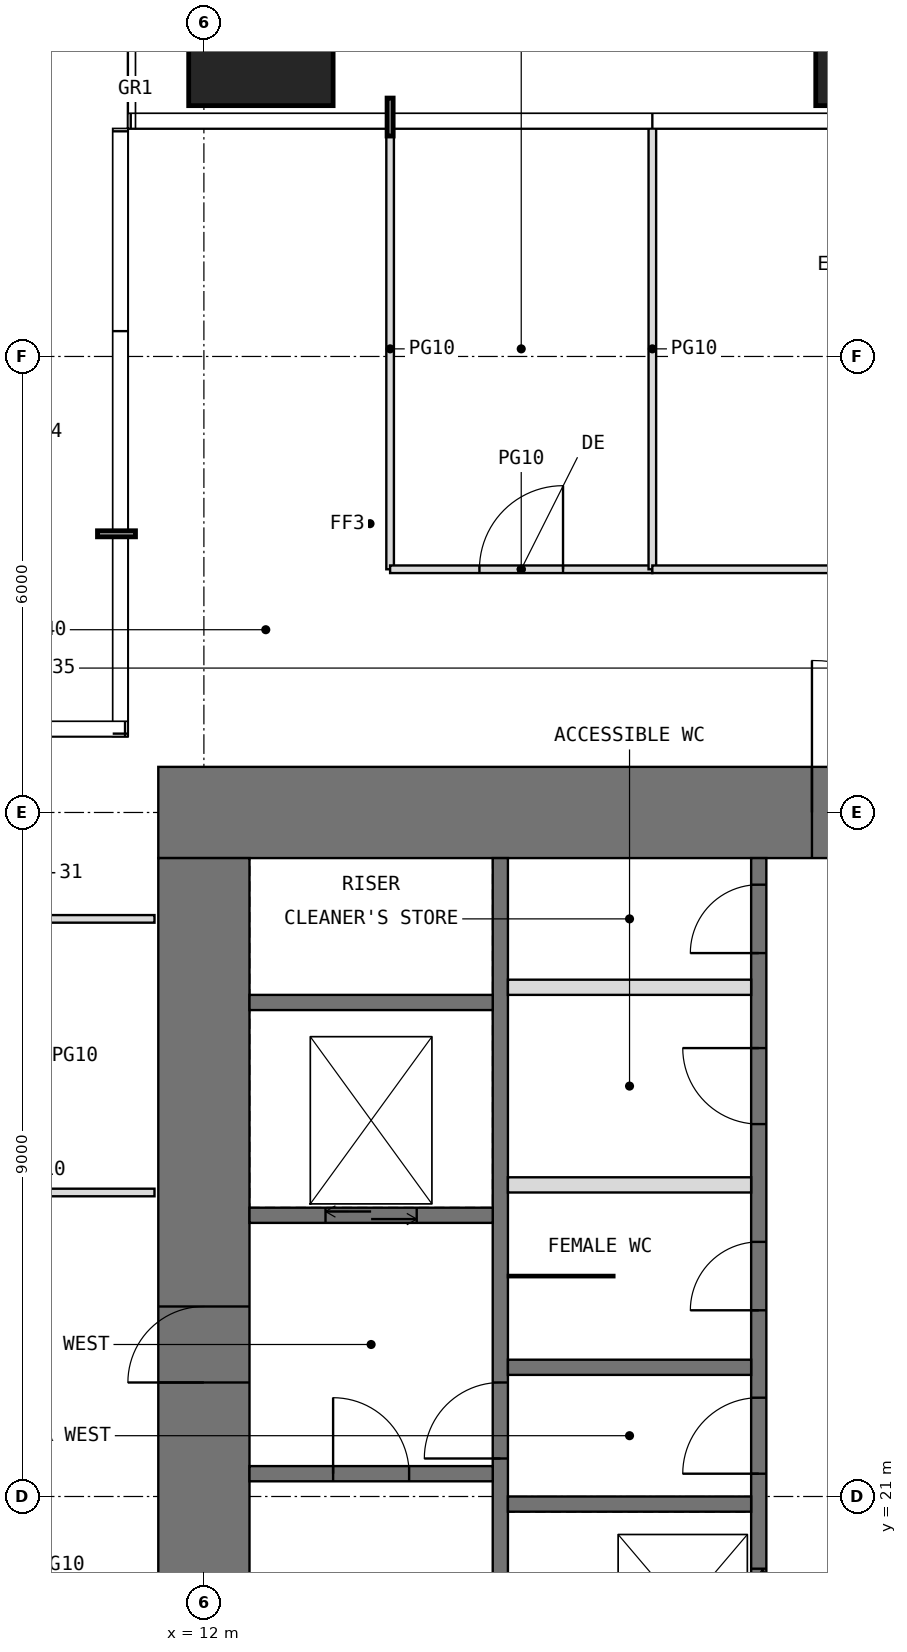
"""IFC4 building model, lengths in metres.
Left out: names, types, materials, properties, quantities, classifications, styles, units other than length and angle.
Written with IfcOpenShell. Run it as: python <this file> out.ifc"""

import sys

from ifc_helpers import new_model, si_unit, direction, frame, frame_2d, origin, origin_2d, place, context, subcontext, project, spatial, rectangle, extrude, element, fill, save


model = new_model("IFC4")
c1 = context("Model", 3, precision=1e-05, world=origin(), true_north=direction((0.0, 1.0)))
c2 = subcontext(c1, "Body", "Model", "MODEL_VIEW")
j1 = project(units=[si_unit("LENGTHUNIT", "METRE"), si_unit("PLANEANGLEUNIT", "RADIAN")], contexts=[c1])
p1 = place(None, origin())
s1 = spatial("IfcSite", under=j1, at=p1, CompositionType="ELEMENT")
p2 = place(p1, origin())
s2 = spatial("IfcBuilding", under=s1, at=p2, CompositionType="ELEMENT")
p3 = place(p2, frame((0.0, 0.0, 252.4)))
s3 = spatial("IfcBuildingStorey", under=s2, at=p3, CompositionType="ELEMENT", Elevation=252.4)
for number, where, z_axis, x_axis in (
    (1, (12.75, 40.25, 0.0), (0.0, 0.0, 1.0), (1.0, 0.0, 0.0)),
    (2, (21.0, 40.25, 0.0), (0.0, 0.0, 1.0), (1.0, 0.0, 0.0)),
):
    element("IfcColumn", number, at=place(p3, frame(where, z_axis=z_axis, x_axis=x_axis)), inside=s3, PredefinedType="COLUMN", context=c2, shape_type="SweptSolid", body=[
        extrude(rectangle(XDim=1.9, YDim=1.9, at=origin_2d()), origin(), (0.0, 0.0, 1.0), 4.2),
    ])
p4 = place(p3, frame((11.4, 30.0, -0.05), z_axis=(0.0, 0.0, 1.0), x_axis=(1.0, 0.0, 0.0)))
e3 = element("IfcWall", 3, at=p4, inside=s3, PredefinedType="SHEAR", context=c2, shape_type="SweptSolid", body=[
    extrude(rectangle(XDim=19.2, YDim=1.2, at=frame_2d((9.6, 0.0))), origin(), (0.0, 0.0, 1.0), 4.2),
])
p5 = place(p4, frame((8.6, 0.0, 0.05)))
e4 = element("IfcOpeningElement", 4, at=p5, cuts=e3, PredefinedType="OPENING", context=c2, shape_type="SweptSolid", body=[
    extrude(rectangle(XDim=2.0, YDim=2.2, at=frame_2d((1.0, 1.1))), frame((0.0, 0.61, 0.0), z_axis=(0.0, -1.0, 0.0), x_axis=(1.0, 0.0, 0.0)), (0.0, 0.0, 1.0), 1.22),
])
p6 = place(p3, frame((12.0, 12.6, -0.05), z_axis=(0.0, 0.0, 1.0), x_axis=(0.0, 1.0, 0.0)))
e5 = element("IfcWall", 5, at=p6, inside=s3, PredefinedType="SHEAR", context=c2, shape_type="SweptSolid", body=[
    extrude(rectangle(XDim=16.8, YDim=1.2, at=frame_2d((8.4, 0.0))), origin(), (0.0, 0.0, 1.0), 4.2),
])
p7 = place(p6, frame((9.9, 0.0, 0.05)))
e6 = element("IfcOpeningElement", 6, at=p7, cuts=e5, PredefinedType="OPENING", context=c2, shape_type="SweptSolid", body=[
    extrude(rectangle(XDim=1.0, YDim=2.2, at=frame_2d((0.5, 1.1))), frame((0.0, 0.61, 0.0), z_axis=(0.0, -1.0, 0.0), x_axis=(1.0, 0.0, 0.0)), (0.0, 0.0, 1.0), 1.22),
])
p8 = place(p3, frame((15.9, 12.6, -0.05), z_axis=(0.0, 0.0, 1.0), x_axis=(0.0, 1.0, 0.0)))
e7 = element("IfcWall", 7, at=p8, inside=s3, PredefinedType="SHEAR", context=c2, shape_type="SweptSolid", body=[
    extrude(rectangle(XDim=16.8, YDim=0.2, at=frame_2d((8.4, 0.0))), origin(), (0.0, 0.0, 1.0), 4.2),
])
p9 = place(p8, frame((8.9, 0.0, 0.05)))
e8 = element("IfcOpeningElement", 8, at=p9, cuts=e7, PredefinedType="OPENING", context=c2, shape_type="SweptSolid", body=[
    extrude(rectangle(XDim=1.0, YDim=2.2, at=frame_2d((0.5, 1.1))), frame((0.0, 0.11, 0.0), z_axis=(0.0, -1.0, 0.0), x_axis=(1.0, 0.0, 0.0)), (0.0, 0.0, 1.0), 0.22),
])
p10 = place(p3, frame((19.3, 12.6, -0.05), z_axis=(0.0, 0.0, 1.0), x_axis=(0.0, 1.0, 0.0)))
e9 = element("IfcWall", 9, at=p10, inside=s3, PredefinedType="SHEAR", context=c2, shape_type="SweptSolid", body=[
    extrude(rectangle(XDim=16.8, YDim=0.2, at=frame_2d((8.4, 0.0))), origin(), (0.0, 0.0, 1.0), 4.2),
])
p11 = place(p10, frame((8.7, 0.0, 0.05)))
e10 = element("IfcOpeningElement", 10, at=p11, cuts=e9, PredefinedType="OPENING", context=c2, shape_type="SweptSolid", body=[
    extrude(rectangle(XDim=1.0, YDim=2.2, at=frame_2d((0.5, 1.1))), frame((0.0, 0.11, 0.0), z_axis=(0.0, -1.0, 0.0), x_axis=(1.0, 0.0, 0.0)), (0.0, 0.0, 1.0), 0.22),
])
p12 = place(p10, frame((10.85, 0.0, 0.05)))
e11 = element("IfcOpeningElement", 11, at=p12, cuts=e9, PredefinedType="OPENING", context=c2, shape_type="SweptSolid", body=[
    extrude(rectangle(XDim=0.9, YDim=2.2, at=frame_2d((0.45, 1.1))), frame((0.0, 0.11, 0.0), z_axis=(0.0, -1.0, 0.0), x_axis=(1.0, 0.0, 0.0)), (0.0, 0.0, 1.0), 0.22),
])
p13 = place(p10, frame((13.3, 0.0, 0.05)))
e12 = element("IfcOpeningElement", 12, at=p13, cuts=e9, PredefinedType="OPENING", context=c2, shape_type="SweptSolid", body=[
    extrude(rectangle(XDim=1.0, YDim=2.2, at=frame_2d((0.5, 1.1))), frame((0.0, 0.11, 0.0), z_axis=(0.0, -1.0, 0.0), x_axis=(1.0, 0.0, 0.0)), (0.0, 0.0, 1.0), 0.22),
])
p14 = place(p10, frame((15.55, 0.0, 0.05)))
e13 = element("IfcOpeningElement", 13, at=p14, cuts=e9, PredefinedType="OPENING", context=c2, shape_type="SweptSolid", body=[
    extrude(rectangle(XDim=0.9, YDim=2.2, at=frame_2d((0.45, 1.1))), frame((0.0, 0.11, 0.0), z_axis=(0.0, -1.0, 0.0), x_axis=(1.0, 0.0, 0.0)), (0.0, 0.0, 1.0), 0.22),
])
p15 = place(p10, frame((0.75, 0.0, 0.05)))
e14 = element("IfcOpeningElement", 14, at=p15, cuts=e9, PredefinedType="OPENING", context=c2, shape_type="SweptSolid", body=[
    extrude(rectangle(XDim=1.1, YDim=2.2, at=frame_2d((0.55, 1.1))), frame((0.0, 0.11, 0.0), z_axis=(0.0, -1.0, 0.0), x_axis=(1.0, 0.0, 0.0)), (0.0, 0.0, 1.0), 0.22),
])
p16 = place(p10, frame((3.55, 0.0, 0.05)))
e15 = element("IfcOpeningElement", 15, at=p16, cuts=e9, PredefinedType="OPENING", context=c2, shape_type="SweptSolid", body=[
    extrude(rectangle(XDim=1.1, YDim=2.2, at=frame_2d((0.55, 1.1))), frame((0.0, 0.11, 0.0), z_axis=(0.0, -1.0, 0.0), x_axis=(1.0, 0.0, 0.0)), (0.0, 0.0, 1.0), 0.22),
])
p17 = place(p10, frame((6.35, 0.0, 0.05)))
e16 = element("IfcOpeningElement", 16, at=p17, cuts=e9, PredefinedType="OPENING", context=c2, shape_type="SweptSolid", body=[
    extrude(rectangle(XDim=1.1, YDim=2.2, at=frame_2d((0.55, 1.1))), frame((0.0, 0.11, 0.0), z_axis=(0.0, -1.0, 0.0), x_axis=(1.0, 0.0, 0.0)), (0.0, 0.0, 1.0), 0.22),
])
p18 = place(p3, frame((12.6, 21.3, -0.05), z_axis=(0.0, 0.0, 1.0), x_axis=(1.0, 0.0, 0.0)))
e17 = element("IfcWall", 17, at=p18, inside=s3, PredefinedType="SHEAR", context=c2, shape_type="SweptSolid", body=[
    extrude(rectangle(XDim=3.2, YDim=0.2, at=frame_2d((1.6, 0.0))), origin(), (0.0, 0.0, 1.0), 4.2),
])
p19 = place(p18, frame((1.1, 0.0, 0.05)))
e18 = element("IfcOpeningElement", 18, at=p19, cuts=e17, PredefinedType="OPENING", context=c2, shape_type="SweptSolid", body=[
    extrude(rectangle(XDim=1.0, YDim=2.2, at=frame_2d((0.5, 1.1))), frame((0.0, 0.11, 0.0), z_axis=(0.0, -1.0, 0.0), x_axis=(1.0, 0.0, 0.0)), (0.0, 0.0, 1.0), 0.22),
])
p20 = place(p3, frame((12.6, 24.7, -0.05), z_axis=(0.0, 0.0, 1.0), x_axis=(1.0, 0.0, 0.0)))
e19 = element("IfcWall", 19, at=p20, inside=s3, PredefinedType="SHEAR", context=c2, shape_type="SweptSolid", body=[
    extrude(rectangle(XDim=3.2, YDim=0.2, at=frame_2d((1.6, 0.0))), origin(), (0.0, 0.0, 1.0), 4.2),
])
p21 = place(p20, frame((1.0, 0.0, 0.05)))
e20 = element("IfcOpeningElement", 20, at=p21, cuts=e19, PredefinedType="OPENING", context=c2, shape_type="SweptSolid", body=[
    extrude(rectangle(XDim=1.2, YDim=2.2, at=frame_2d((0.6, 1.1))), frame((0.0, 0.11, 0.0), z_axis=(0.0, -1.0, 0.0), x_axis=(1.0, 0.0, 0.0)), (0.0, 0.0, 1.0), 0.22),
])
for number, where, z_axis, x_axis in (
    (21, (12.6, 27.5, -0.05), (0.0, 0.0, 1.0), (1.0, 0.0, 0.0)),
    (22, (16.0, 20.9, -0.05), (0.0, 0.0, 1.0), (1.0, 0.0, 0.0)),
    (23, (16.0, 22.7, -0.05), (0.0, 0.0, 1.0), (1.0, 0.0, 0.0)),
):
    element("IfcWall", number, at=place(p3, frame(where, z_axis=z_axis, x_axis=x_axis)), inside=s3, PredefinedType="SHEAR", context=c2, shape_type="SweptSolid", body=[
        extrude(rectangle(XDim=3.2, YDim=0.2, at=frame_2d((1.6, 0.0))), origin(), (0.0, 0.0, 1.0), 4.2),
    ])
for number, where, z_axis, x_axis in (
    (24, (16.0, 25.1, 0.0), (0.0, 0.0, 1.0), (1.0, 0.0, 0.0)),
    (25, (16.0, 27.7, 0.0), (0.0, 0.0, 1.0), (1.0, 0.0, 0.0)),
):
    element("IfcWall", number, at=place(p3, frame(where, z_axis=z_axis, x_axis=x_axis)), inside=s3, PredefinedType="PARTITIONING", context=c2, shape_type="SweptSolid", body=[
        extrude(rectangle(XDim=3.2, YDim=0.2, at=frame_2d((1.6, 0.0))), origin(), (0.0, 0.0, 1.0), 3.95),
    ])
p22 = place(p3, frame((16.0, 23.9, 0.0), z_axis=(0.0, 0.0, 1.0), x_axis=(1.0, 0.0, 0.0)))
e26 = element("IfcWall", 26, at=p22, inside=s3, PredefinedType="PARTITIONING", context=c2, shape_type="SweptSolid", body=[
    extrude(rectangle(XDim=1.4, YDim=0.03, at=frame_2d((0.7, 0.0))), origin(), (0.0, 0.0, 1.0), 3.95),
])
for number, where, z_axis, x_axis in (
    (27, (8.4, 25.0, 0.0), (0.0, 0.0, 1.0), (1.0, 0.0, 0.0)),
    (28, (8.4, 28.6, 0.0), (0.0, 0.0, 1.0), (1.0, 0.0, 0.0)),
):
    element("IfcWall", number, at=place(p3, frame(where, z_axis=z_axis, x_axis=x_axis)), inside=s3, PredefinedType="PARTITIONING", context=c2, shape_type="SweptSolid", body=[
        extrude(rectangle(XDim=2.95, YDim=0.1, at=frame_2d((1.475, 0.0))), origin(), (0.0, 0.0, 1.0), 3.95),
    ])
p23 = place(p3, frame((14.45, 33.2, 0.0), z_axis=(0.0, 0.0, 1.0), x_axis=(0.0, 1.0, 0.0)))
e29 = element("IfcWall", 29, at=p23, inside=s3, PredefinedType="PARTITIONING", context=c2, shape_type="SweptSolid", body=[
    extrude(rectangle(XDim=5.8, YDim=0.1, at=frame_2d((2.9, 0.0))), origin(), (0.0, 0.0, 1.0), 3.95),
])
p24 = place(p3, frame((14.45, 33.2, 0.0), z_axis=(0.0, 0.0, 1.0), x_axis=(1.0, 0.0, 0.0)))
e30 = element("IfcWall", 30, at=p24, inside=s3, PredefinedType="PARTITIONING", context=c2, shape_type="SweptSolid", body=[
    extrude(rectangle(XDim=3.45, YDim=0.1, at=frame_2d((1.725, 0.0))), origin(), (0.0, 0.0, 1.0), 3.95),
])
p25 = place(p24, frame((1.175, 0.0, 0.0)))
e31 = element("IfcOpeningElement", 31, at=p25, cuts=e30, PredefinedType="OPENING", context=c2, shape_type="SweptSolid", body=[
    extrude(rectangle(XDim=1.1, YDim=2.3, at=frame_2d((0.55, 1.15))), frame((0.0, 0.06, 0.0), z_axis=(0.0, -1.0, 0.0), x_axis=(1.0, 0.0, 0.0)), (0.0, 0.0, 1.0), 0.12),
])
p26 = place(p3, frame((17.9, 33.2, 0.0), z_axis=(0.0, 0.0, 1.0), x_axis=(0.0, 1.0, 0.0)))
e32 = element("IfcWall", 32, at=p26, inside=s3, PredefinedType="PARTITIONING", context=c2, shape_type="SweptSolid", body=[
    extrude(rectangle(XDim=5.8, YDim=0.1, at=frame_2d((2.9, 0.0))), origin(), (0.0, 0.0, 1.0), 3.95),
])
p27 = place(p3, frame((17.9, 33.2, 0.0), z_axis=(0.0, 0.0, 1.0), x_axis=(1.0, 0.0, 0.0)))
e33 = element("IfcWall", 33, at=p27, inside=s3, PredefinedType="PARTITIONING", context=c2, shape_type="SweptSolid", body=[
    extrude(rectangle(XDim=10.3, YDim=0.1, at=frame_2d((5.15, 0.0))), origin(), (0.0, 0.0, 1.0), 3.95),
])
p28 = place(p27, frame((4.75, 0.0, 0.0)))
e34 = element("IfcOpeningElement", 34, at=p28, cuts=e33, PredefinedType="OPENING", context=c2, shape_type="SweptSolid", body=[
    extrude(rectangle(XDim=1.8, YDim=2.4, at=frame_2d((0.9, 1.2))), frame((0.0, 0.06, 0.0), z_axis=(0.0, -1.0, 0.0), x_axis=(1.0, 0.0, 0.0)), (0.0, 0.0, 1.0), 0.12),
])
p29 = place(p5, origin())
e35 = element("IfcDoor", 35, at=p29, inside=s3, OperationType="DOUBLE_DOOR_SINGLE_SWING", PredefinedType="DOOR", context=c2, shape_type="SweptSolid", body=[
    extrude(rectangle(XDim=2.0, YDim=2.2, at=frame_2d((1.0, 1.1))), frame((0.0, 0.025, 0.0), z_axis=(0.0, -1.0, 0.0), x_axis=(1.0, 0.0, 0.0)), (0.0, 0.0, 1.0), 0.05),
])
fill(e4, e35)
p30 = place(p7, origin())
e36 = element("IfcDoor", 36, at=p30, inside=s3, OperationType="SINGLE_SWING_LEFT", PredefinedType="DOOR", context=c2, shape_type="SweptSolid", body=[
    extrude(rectangle(XDim=1.0, YDim=2.2, at=frame_2d((0.5, 1.1))), frame((0.0, 0.025, 0.0), z_axis=(0.0, -1.0, 0.0), x_axis=(1.0, 0.0, 0.0)), (0.0, 0.0, 1.0), 0.05),
])
fill(e6, e36)
p31 = place(p19, origin())
e37 = element("IfcDoor", 37, at=p31, inside=s3, OperationType="SINGLE_SWING_LEFT", PredefinedType="DOOR", context=c2, shape_type="SweptSolid", body=[
    extrude(rectangle(XDim=1.0, YDim=2.2, at=frame_2d((0.5, 1.1))), frame((0.0, 0.025, 0.0), z_axis=(0.0, -1.0, 0.0), x_axis=(1.0, 0.0, 0.0)), (0.0, 0.0, 1.0), 0.05),
])
fill(e18, e37)
p32 = place(p9, origin())
e38 = element("IfcDoor", 38, at=p32, inside=s3, OperationType="SINGLE_SWING_LEFT", PredefinedType="DOOR", context=c2, shape_type="SweptSolid", body=[
    extrude(rectangle(XDim=1.0, YDim=2.2, at=frame_2d((0.5, 1.1))), frame((0.0, 0.025, 0.0), z_axis=(0.0, -1.0, 0.0), x_axis=(1.0, 0.0, 0.0)), (0.0, 0.0, 1.0), 0.05),
])
fill(e8, e38)
p33 = place(p11, origin())
e39 = element("IfcDoor", 39, at=p33, inside=s3, OperationType="SINGLE_SWING_LEFT", PredefinedType="DOOR", context=c2, shape_type="SweptSolid", body=[
    extrude(rectangle(XDim=1.0, YDim=2.2, at=frame_2d((0.5, 1.1))), frame((0.0, 0.025, 0.0), z_axis=(0.0, -1.0, 0.0), x_axis=(1.0, 0.0, 0.0)), (0.0, 0.0, 1.0), 0.05),
])
fill(e10, e39)
p34 = place(p12, origin())
e40 = element("IfcDoor", 40, at=p34, inside=s3, OperationType="SINGLE_SWING_LEFT", PredefinedType="DOOR", context=c2, shape_type="SweptSolid", body=[
    extrude(rectangle(XDim=0.9, YDim=2.2, at=frame_2d((0.45, 1.1))), frame((0.0, 0.025, 0.0), z_axis=(0.0, -1.0, 0.0), x_axis=(1.0, 0.0, 0.0)), (0.0, 0.0, 1.0), 0.05),
])
fill(e11, e40)
p35 = place(p13, origin())
e41 = element("IfcDoor", 41, at=p35, inside=s3, OperationType="SINGLE_SWING_RIGHT", PredefinedType="DOOR", context=c2, shape_type="SweptSolid", body=[
    extrude(rectangle(XDim=1.0, YDim=2.2, at=frame_2d((0.5, 1.1))), frame((0.0, 0.025, 0.0), z_axis=(0.0, -1.0, 0.0), x_axis=(1.0, 0.0, 0.0)), (0.0, 0.0, 1.0), 0.05),
])
fill(e12, e41)
p36 = place(p14, origin())
e42 = element("IfcDoor", 42, at=p36, inside=s3, OperationType="SINGLE_SWING_LEFT", PredefinedType="DOOR", context=c2, shape_type="SweptSolid", body=[
    extrude(rectangle(XDim=0.9, YDim=2.2, at=frame_2d((0.45, 1.1))), frame((0.0, 0.025, 0.0), z_axis=(0.0, -1.0, 0.0), x_axis=(1.0, 0.0, 0.0)), (0.0, 0.0, 1.0), 0.05),
])
fill(e13, e42)
p37 = place(p25, origin())
e43 = element("IfcDoor", 43, at=p37, inside=s3, OperationType="SINGLE_SWING_RIGHT", PredefinedType="DOOR", context=c2, shape_type="SweptSolid", body=[
    extrude(rectangle(XDim=1.1, YDim=2.3, at=frame_2d((0.55, 1.15))), frame((0.0, 0.025, 0.0), z_axis=(0.0, -1.0, 0.0), x_axis=(1.0, 0.0, 0.0)), (0.0, 0.0, 1.0), 0.05),
])
fill(e31, e43)
p38 = place(p17, origin())
e44 = element("IfcDoor", 44, at=p38, inside=s3, OperationType="DOUBLE_DOOR_SLIDING", PredefinedType="DOOR", context=c2, shape_type="SweptSolid", body=[
    extrude(rectangle(XDim=1.1, YDim=2.2, at=frame_2d((0.55, 1.1))), frame((0.0, 0.025, 0.0), z_axis=(0.0, -1.0, 0.0), x_axis=(1.0, 0.0, 0.0)), (0.0, 0.0, 1.0), 0.05),
])
fill(e16, e44)
p39 = place(p21, origin())
e45 = element("IfcDoor", 45, at=p39, inside=s3, OperationType="DOUBLE_DOOR_SLIDING", PredefinedType="DOOR", context=c2, shape_type="SweptSolid", body=[
    extrude(rectangle(XDim=1.2, YDim=2.2, at=frame_2d((0.6, 1.1))), frame((0.0, 0.025, 0.0), z_axis=(0.0, -1.0, 0.0), x_axis=(1.0, 0.0, 0.0)), (0.0, 0.0, 1.0), 0.05),
])
fill(e20, e45)
save(model, sys.argv[1])
